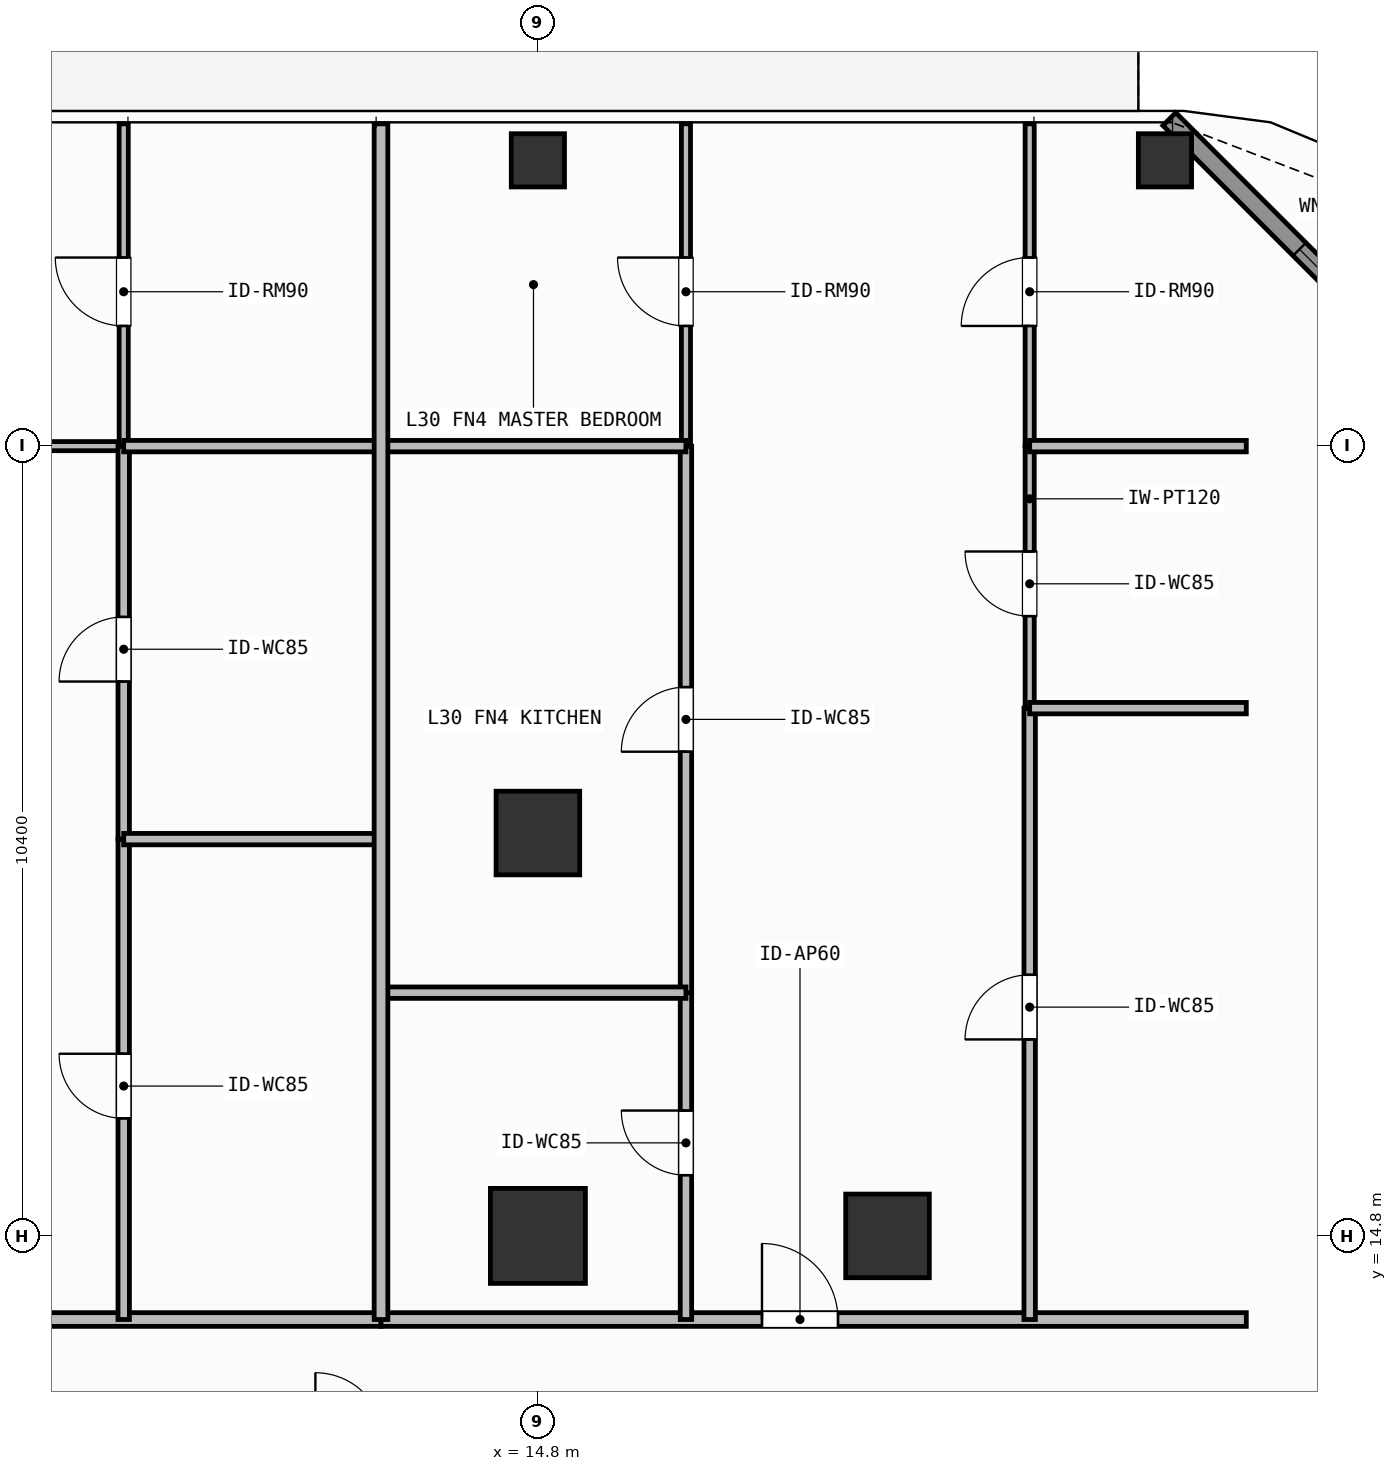
"""IFC4 building model, lengths in metres.
Left out: names, types, materials, properties, quantities, classifications, styles, units other than length and angle.
Written with IfcOpenShell. Run it as: python <this file> out.ifc"""

import sys

from ifc_helpers import new_model, si_unit, direction, frame, frame_2d, origin, origin_2d, place, context, subcontext, project, spatial, rectangle, hollow_rectangle, extrude, element, fill, save


model = new_model("IFC4")
c1 = context("Model", 3, precision=1e-05, world=origin(), true_north=direction((0.0, 1.0)))
c2 = subcontext(c1, "Body", "Model", "MODEL_VIEW")
j1 = project(units=[si_unit("LENGTHUNIT", "METRE"), si_unit("PLANEANGLEUNIT", "RADIAN")], contexts=[c1])
p1 = place(None, origin())
s1 = spatial("IfcSite", under=j1, at=p1, CompositionType="ELEMENT")
p2 = place(p1, origin())
s2 = spatial("IfcBuilding", under=s1, at=p2, CompositionType="ELEMENT")
p3 = place(p2, frame((0.0, 0.0, 121.2)))
s3 = spatial("IfcBuildingStorey", under=s2, at=p3, CompositionType="ELEMENT", Elevation=121.2)
p4 = place(p3, frame((14.8, 14.8, 0.0), z_axis=(0.0, 0.0, 1.0), x_axis=(1.0, 0.0, 0.0)))
e1 = element("IfcColumn", 1, at=p4, inside=s3, PredefinedType="COLUMN", context=c2, shape_type="SweptSolid", body=[
    extrude(rectangle(XDim=1.25, YDim=1.25, at=origin_2d()), origin(), (0.0, 0.0, 1.0), 3.9),
])
for number, where, z_axis, x_axis in (
    (2, (19.4, 14.8, 0.0), (0.0, 0.0, 1.0), (1.0, 0.0, 0.0)),
    (3, (14.8, 20.1, 0.0), (0.0, 0.0, 1.0), (1.0, 0.0, 0.0)),
):
    element("IfcColumn", number, at=place(p3, frame(where, z_axis=z_axis, x_axis=x_axis)), inside=s3, PredefinedType="COLUMN", context=c2, shape_type="SweptSolid", body=[
        extrude(rectangle(XDim=1.1, YDim=1.1, at=origin_2d()), origin(), (0.0, 0.0, 1.0), 3.9),
    ])
for number, where, z_axis, x_axis in (
    (4, (23.05, 28.95, 0.0), (0.0, 0.0, 1.0), (1.0, 0.0, 0.0)),
    (5, (14.8, 28.95, 0.0), (0.0, 0.0, 1.0), (1.0, 0.0, 0.0)),
):
    element("IfcColumn", number, at=place(p3, frame(where, z_axis=z_axis, x_axis=x_axis)), inside=s3, PredefinedType="COLUMN", context=c2, shape_type="SweptSolid", body=[
        extrude(hollow_rectangle(XDim=0.7, YDim=0.7, WallThickness=0.032, at=origin_2d()), origin(), (0.0, 0.0, 1.0), 3.9),
    ])
p5 = place(p3, frame((23.108, 29.492, 0.0), z_axis=(0.0, 0.0, 1.0), x_axis=(0.707087534163, -0.707126027686, 0.0)))
e6 = element("IfcWall", 6, at=p5, inside=s3, PredefinedType="SOLIDWALL", context=c2, shape_type="SweptSolid", body=[
    extrude(rectangle(XDim=6.342, YDim=0.24, at=frame_2d((3.171, 0.0))), origin(), (0.0, 0.0, 1.0), 3.68),
])
p6 = place(p5, frame((2.421, 0.0, 0.8)))
e7 = element("IfcOpeningElement", 7, at=p6, cuts=e6, PredefinedType="OPENING", context=c2, shape_type="SweptSolid", body=[
    extrude(rectangle(XDim=1.5, YDim=1.85, at=frame_2d((0.75, 0.925))), frame((0.0, 0.13, 0.0), z_axis=(0.0, -1.0, 0.0), x_axis=(1.0, 0.0, 0.0)), (0.0, 0.0, 1.0), 0.26),
])
p7 = place(p3, frame((3.9, 13.7, 0.0), z_axis=(0.0, 0.0, 1.0), x_axis=(1.0, 0.0, 0.0)))
e8 = element("IfcWall", 8, at=p7, inside=s3, PredefinedType="PARTITIONING", context=c2, shape_type="SweptSolid", body=[
    extrude(rectangle(XDim=8.836, YDim=0.18, at=frame_2d((4.418, 0.0))), origin(), (0.0, 0.0, 1.0), 3.68),
])
p8 = place(p7, frame((1.771, 0.0, 0.0)))
e9 = element("IfcOpeningElement", 9, at=p8, cuts=e8, PredefinedType="OPENING", context=c2, shape_type="SweptSolid", body=[
    extrude(rectangle(XDim=1.0, YDim=2.2, at=frame_2d((0.5, 1.1))), frame((0.0, 0.1, 0.0), z_axis=(0.0, -1.0, 0.0), x_axis=(1.0, 0.0, 0.0)), (0.0, 0.0, 1.0), 0.2),
])
p9 = place(p3, frame((3.9, 25.19, 0.0), z_axis=(0.0, 0.0, 1.0), x_axis=(1.0, 0.0, 0.0)))
e10 = element("IfcWall", 10, at=p9, inside=s3, PredefinedType="PARTITIONING", context=c2, shape_type="SweptSolid", body=[
    extrude(rectangle(XDim=5.451, YDim=0.12, at=frame_2d((2.726, 0.0))), origin(), (0.0, 0.0, 1.0), 3.68),
])
p10 = place(p9, frame((2.275, 0.0, 0.0)))
e11 = element("IfcOpeningElement", 11, at=p10, cuts=e10, PredefinedType="OPENING", context=c2, shape_type="SweptSolid", body=[
    extrude(rectangle(XDim=0.9, YDim=2.1, at=frame_2d((0.45, 1.05))), frame((0.0, 0.07, 0.0), z_axis=(0.0, -1.0, 0.0), x_axis=(1.0, 0.0, 0.0)), (0.0, 0.0, 1.0), 0.14),
])
p11 = place(p3, frame((9.351, 13.7, 0.0), z_axis=(0.0, 0.0, 1.0), x_axis=(0.0, 1.0, 0.0)))
e12 = element("IfcWall", 12, at=p11, inside=s3, PredefinedType="PARTITIONING", context=c2, shape_type="SweptSolid", body=[
    extrude(rectangle(XDim=6.32, YDim=0.15, at=frame_2d((3.16, 0.0))), origin(), (0.0, 0.0, 1.0), 3.68),
])
p12 = place(p11, frame((2.646, 0.0, 0.0)))
e13 = element("IfcOpeningElement", 13, at=p12, cuts=e12, PredefinedType="OPENING", context=c2, shape_type="SweptSolid", body=[
    extrude(rectangle(XDim=0.85, YDim=2.1, at=frame_2d((0.425, 1.05))), frame((0.0, 0.085, 0.0), z_axis=(0.0, -1.0, 0.0), x_axis=(1.0, 0.0, 0.0)), (0.0, 0.0, 1.0), 0.17),
])
p13 = place(p3, frame((9.351, 20.02, 0.0), z_axis=(0.0, 0.0, 1.0), x_axis=(0.0, 1.0, 0.0)))
e14 = element("IfcWall", 14, at=p13, inside=s3, PredefinedType="PARTITIONING", context=c2, shape_type="SweptSolid", body=[
    extrude(rectangle(XDim=5.17, YDim=0.15, at=frame_2d((2.585, 0.0))), origin(), (0.0, 0.0, 1.0), 3.68),
])
p14 = place(p13, frame((2.073, 0.0, 0.0)))
e15 = element("IfcOpeningElement", 15, at=p14, cuts=e14, PredefinedType="OPENING", context=c2, shape_type="SweptSolid", body=[
    extrude(rectangle(XDim=0.85, YDim=2.1, at=frame_2d((0.425, 1.05))), frame((0.0, 0.085, 0.0), z_axis=(0.0, -1.0, 0.0), x_axis=(1.0, 0.0, 0.0)), (0.0, 0.0, 1.0), 0.17),
])
p15 = place(p3, frame((9.351, 25.19, 0.0), z_axis=(0.0, 0.0, 1.0), x_axis=(0.0, 1.0, 0.0)))
e16 = element("IfcWall", 16, at=p15, inside=s3, PredefinedType="PARTITIONING", context=c2, shape_type="SweptSolid", body=[
    extrude(rectangle(XDim=4.24, YDim=0.12, at=frame_2d((2.12, 0.0))), origin(), (0.0, 0.0, 1.0), 3.68),
])
p16 = place(p15, frame((1.581, 0.0, 0.0)))
e17 = element("IfcOpeningElement", 17, at=p16, cuts=e16, PredefinedType="OPENING", context=c2, shape_type="SweptSolid", body=[
    extrude(rectangle(XDim=0.9, YDim=2.1, at=frame_2d((0.45, 1.05))), frame((0.0, 0.07, 0.0), z_axis=(0.0, -1.0, 0.0), x_axis=(1.0, 0.0, 0.0)), (0.0, 0.0, 1.0), 0.14),
])
p17 = place(p3, frame((12.736, 13.7, 0.0), z_axis=(0.0, 0.0, 1.0), x_axis=(1.0, 0.0, 0.0)))
e18 = element("IfcWall", 18, at=p17, inside=s3, PredefinedType="PARTITIONING", context=c2, shape_type="SweptSolid", body=[
    extrude(rectangle(XDim=11.384, YDim=0.18, at=frame_2d((5.692, 0.0))), origin(), (0.0, 0.0, 1.0), 3.68),
])
p18 = place(p17, frame((5.012, 0.0, 0.0)))
e19 = element("IfcOpeningElement", 19, at=p18, cuts=e18, PredefinedType="OPENING", context=c2, shape_type="SweptSolid", body=[
    extrude(rectangle(XDim=1.0, YDim=2.2, at=frame_2d((0.5, 1.1))), frame((0.0, 0.1, 0.0), z_axis=(0.0, -1.0, 0.0), x_axis=(1.0, 0.0, 0.0)), (0.0, 0.0, 1.0), 0.2),
])
p19 = place(p3, frame((16.748, 13.7, 0.0), z_axis=(0.0, 0.0, 1.0), x_axis=(0.0, 1.0, 0.0)))
e20 = element("IfcWall", 20, at=p19, inside=s3, PredefinedType="PARTITIONING", context=c2, shape_type="SweptSolid", body=[
    extrude(rectangle(XDim=4.3, YDim=0.15, at=frame_2d((2.15, 0.0))), origin(), (0.0, 0.0, 1.0), 3.68),
])
p20 = place(p19, frame((1.899, 0.0, 0.0)))
e21 = element("IfcOpeningElement", 21, at=p20, cuts=e20, PredefinedType="OPENING", context=c2, shape_type="SweptSolid", body=[
    extrude(rectangle(XDim=0.85, YDim=2.1, at=frame_2d((0.425, 1.05))), frame((0.0, 0.085, 0.0), z_axis=(0.0, -1.0, 0.0), x_axis=(1.0, 0.0, 0.0)), (0.0, 0.0, 1.0), 0.17),
])
p21 = place(p3, frame((16.748, 18.0, 0.0), z_axis=(0.0, 0.0, 1.0), x_axis=(0.0, 1.0, 0.0)))
e22 = element("IfcWall", 22, at=p21, inside=s3, PredefinedType="PARTITIONING", context=c2, shape_type="SweptSolid", body=[
    extrude(rectangle(XDim=7.19, YDim=0.15, at=frame_2d((3.595, 0.0))), origin(), (0.0, 0.0, 1.0), 3.68),
])
p22 = place(p21, frame((3.17, 0.0, 0.0)))
e23 = element("IfcOpeningElement", 23, at=p22, cuts=e22, PredefinedType="OPENING", context=c2, shape_type="SweptSolid", body=[
    extrude(rectangle(XDim=0.85, YDim=2.1, at=frame_2d((0.425, 1.05))), frame((0.0, 0.085, 0.0), z_axis=(0.0, -1.0, 0.0), x_axis=(1.0, 0.0, 0.0)), (0.0, 0.0, 1.0), 0.17),
])
p23 = place(p3, frame((16.748, 25.19, 0.0), z_axis=(0.0, 0.0, 1.0), x_axis=(0.0, 1.0, 0.0)))
e24 = element("IfcWall", 24, at=p23, inside=s3, PredefinedType="PARTITIONING", context=c2, shape_type="SweptSolid", body=[
    extrude(rectangle(XDim=4.24, YDim=0.12, at=frame_2d((2.12, 0.0))), origin(), (0.0, 0.0, 1.0), 3.68),
])
p24 = place(p23, frame((1.581, 0.0, 0.0)))
e25 = element("IfcOpeningElement", 25, at=p24, cuts=e24, PredefinedType="OPENING", context=c2, shape_type="SweptSolid", body=[
    extrude(rectangle(XDim=0.9, YDim=2.1, at=frame_2d((0.45, 1.05))), frame((0.0, 0.07, 0.0), z_axis=(0.0, -1.0, 0.0), x_axis=(1.0, 0.0, 0.0)), (0.0, 0.0, 1.0), 0.14),
])
p25 = place(p3, frame((21.27, 13.7, 0.0), z_axis=(0.0, 0.0, 1.0), x_axis=(0.0, 1.0, 0.0)))
e26 = element("IfcWall", 26, at=p25, inside=s3, PredefinedType="PARTITIONING", context=c2, shape_type="SweptSolid", body=[
    extrude(rectangle(XDim=8.043, YDim=0.15, at=frame_2d((4.021, 0.0))), origin(), (0.0, 0.0, 1.0), 3.68),
])
p26 = place(p25, frame((3.685, 0.0, 0.0)))
e27 = element("IfcOpeningElement", 27, at=p26, cuts=e26, PredefinedType="OPENING", context=c2, shape_type="SweptSolid", body=[
    extrude(rectangle(XDim=0.85, YDim=2.1, at=frame_2d((0.425, 1.05))), frame((0.0, 0.085, 0.0), z_axis=(0.0, -1.0, 0.0), x_axis=(1.0, 0.0, 0.0)), (0.0, 0.0, 1.0), 0.17),
])
p27 = place(p3, frame((21.27, 21.743, 0.0), z_axis=(0.0, 0.0, 1.0), x_axis=(0.0, 1.0, 0.0)))
e28 = element("IfcWall", 28, at=p27, inside=s3, PredefinedType="PARTITIONING", context=c2, shape_type="SweptSolid", body=[
    extrude(rectangle(XDim=3.447, YDim=0.12, at=frame_2d((1.724, 0.0))), origin(), (0.0, 0.0, 1.0), 3.68),
])
p28 = place(p27, frame((1.211, 0.0, 0.0)))
e29 = element("IfcOpeningElement", 29, at=p28, cuts=e28, PredefinedType="OPENING", context=c2, shape_type="SweptSolid", body=[
    extrude(rectangle(XDim=0.85, YDim=2.1, at=frame_2d((0.425, 1.05))), frame((0.0, 0.07, 0.0), z_axis=(0.0, -1.0, 0.0), x_axis=(1.0, 0.0, 0.0)), (0.0, 0.0, 1.0), 0.14),
])
p29 = place(p3, frame((21.27, 25.19, 0.0), z_axis=(0.0, 0.0, 1.0), x_axis=(0.0, 1.0, 0.0)))
e30 = element("IfcWall", 30, at=p29, inside=s3, PredefinedType="PARTITIONING", context=c2, shape_type="SweptSolid", body=[
    extrude(rectangle(XDim=4.24, YDim=0.12, at=frame_2d((2.12, 0.0))), origin(), (0.0, 0.0, 1.0), 3.68),
])
p30 = place(p29, frame((1.581, 0.0, 0.0)))
e31 = element("IfcOpeningElement", 31, at=p30, cuts=e30, PredefinedType="OPENING", context=c2, shape_type="SweptSolid", body=[
    extrude(rectangle(XDim=0.9, YDim=2.1, at=frame_2d((0.45, 1.05))), frame((0.0, 0.07, 0.0), z_axis=(0.0, -1.0, 0.0), x_axis=(1.0, 0.0, 0.0)), (0.0, 0.0, 1.0), 0.14),
])
p31 = place(p3, frame((9.351, 20.02, 0.0), z_axis=(0.0, 0.0, 1.0), x_axis=(1.0, 0.0, 0.0)))
e32 = element("IfcWall", 32, at=p31, inside=s3, PredefinedType="PARTITIONING", context=c2, shape_type="SweptSolid", body=[
    extrude(rectangle(XDim=3.385, YDim=0.15, at=frame_2d((1.692, 0.0))), origin(), (0.0, 0.0, 1.0), 3.082),
])
p32 = place(p3, frame((9.351, 25.19, 0.0), z_axis=(0.0, 0.0, 1.0), x_axis=(1.0, 0.0, 0.0)))
e33 = element("IfcWall", 33, at=p32, inside=s3, PredefinedType="PARTITIONING", context=c2, shape_type="SweptSolid", body=[
    extrude(rectangle(XDim=3.385, YDim=0.15, at=frame_2d((1.692, 0.0))), origin(), (0.0, 0.0, 1.0), 3.68),
])
for number, where, z_axis, x_axis in (
    (34, (12.736, 18.0, 0.0), (0.0, 0.0, 1.0), (1.0, 0.0, 0.0)),
    (35, (12.736, 25.19, 0.0), (0.0, 0.0, 1.0), (1.0, 0.0, 0.0)),
):
    element("IfcWall", number, at=place(p3, frame(where, z_axis=z_axis, x_axis=x_axis)), inside=s3, PredefinedType="PARTITIONING", context=c2, shape_type="SweptSolid", body=[
        extrude(rectangle(XDim=4.012, YDim=0.15, at=frame_2d((2.006, 0.0))), origin(), (0.0, 0.0, 1.0), 3.68),
    ])
p33 = place(p3, frame((21.27, 21.743, 0.0), z_axis=(0.0, 0.0, 1.0), x_axis=(1.0, 0.0, 0.0)))
e36 = element("IfcWall", 36, at=p33, inside=s3, PredefinedType="PARTITIONING", context=c2, shape_type="SweptSolid", body=[
    extrude(rectangle(XDim=2.85, YDim=0.15, at=frame_2d((1.425, 0.0))), origin(), (0.0, 0.0, 1.0), 3.37),
])
p34 = place(p3, frame((21.27, 25.19, 0.0), z_axis=(0.0, 0.0, 1.0), x_axis=(1.0, 0.0, 0.0)))
e37 = element("IfcWall", 37, at=p34, inside=s3, PredefinedType="PARTITIONING", context=c2, shape_type="SweptSolid", body=[
    extrude(rectangle(XDim=2.85, YDim=0.15, at=frame_2d((1.425, 0.0))), origin(), (0.0, 0.0, 1.0), 3.68),
])
p35 = place(p3, frame((12.736, 13.7, 0.0), z_axis=(0.0, 0.0, 1.0), x_axis=(0.0, 1.0, 0.0)))
e38 = element("IfcWall", 38, at=p35, inside=s3, PredefinedType="PARTITIONING", context=c2, shape_type="SweptSolid", body=[
    extrude(rectangle(XDim=15.73, YDim=0.18, at=frame_2d((7.865, 0.0))), origin(), (0.0, 0.0, 1.0), 3.68),
])
p36 = place(p6, origin())
e39 = element("IfcWindow", 39, at=p36, inside=s3, PartitioningType="SINGLE_PANEL", PredefinedType="WINDOW", context=c2, shape_type="SweptSolid", body=[
    extrude(rectangle(XDim=1.5, YDim=1.85, at=frame_2d((0.75, 0.925))), frame((0.0, 0.03, 0.0), z_axis=(0.0, -1.0, 0.0), x_axis=(1.0, 0.0, 0.0)), (0.0, 0.0, 1.0), 0.06),
])
fill(e7, e39)
p37 = place(p12, origin())
e40 = element("IfcDoor", 40, at=p37, inside=s3, OperationType="SINGLE_SWING_RIGHT", PredefinedType="DOOR", context=c2, shape_type="SweptSolid", body=[
    extrude(rectangle(XDim=0.85, YDim=2.1, at=frame_2d((0.425, 1.05))), frame((0.0, 0.025, 0.0), z_axis=(0.0, -1.0, 0.0), x_axis=(1.0, 0.0, 0.0)), (0.0, 0.0, 1.0), 0.05),
])
fill(e13, e40)
p38 = place(p14, origin())
e41 = element("IfcDoor", 41, at=p38, inside=s3, OperationType="SINGLE_SWING_LEFT", PredefinedType="DOOR", context=c2, shape_type="SweptSolid", body=[
    extrude(rectangle(XDim=0.85, YDim=2.1, at=frame_2d((0.425, 1.05))), frame((0.0, 0.025, 0.0), z_axis=(0.0, -1.0, 0.0), x_axis=(1.0, 0.0, 0.0)), (0.0, 0.0, 1.0), 0.05),
])
fill(e15, e41)
p39 = place(p16, origin())
e42 = element("IfcDoor", 42, at=p39, inside=s3, OperationType="SINGLE_SWING_RIGHT", PredefinedType="DOOR", context=c2, shape_type="SweptSolid", body=[
    extrude(rectangle(XDim=0.9, YDim=2.1, at=frame_2d((0.45, 1.05))), frame((0.0, 0.025, 0.0), z_axis=(0.0, -1.0, 0.0), x_axis=(1.0, 0.0, 0.0)), (0.0, 0.0, 1.0), 0.05),
])
fill(e17, e42)
p40 = place(p18, origin())
e43 = element("IfcDoor", 43, at=p40, inside=s3, OperationType="SINGLE_SWING_LEFT", PredefinedType="DOOR", context=c2, shape_type="SweptSolid", body=[
    extrude(rectangle(XDim=1.0, YDim=2.2, at=frame_2d((0.5, 1.1))), frame((0.0, 0.025, 0.0), z_axis=(0.0, -1.0, 0.0), x_axis=(1.0, 0.0, 0.0)), (0.0, 0.0, 1.0), 0.05),
])
fill(e19, e43)
p41 = place(p20, origin())
e44 = element("IfcDoor", 44, at=p41, inside=s3, OperationType="SINGLE_SWING_RIGHT", PredefinedType="DOOR", context=c2, shape_type="SweptSolid", body=[
    extrude(rectangle(XDim=0.85, YDim=2.1, at=frame_2d((0.425, 1.05))), frame((0.0, 0.025, 0.0), z_axis=(0.0, -1.0, 0.0), x_axis=(1.0, 0.0, 0.0)), (0.0, 0.0, 1.0), 0.05),
])
fill(e21, e44)
p42 = place(p22, origin())
e45 = element("IfcDoor", 45, at=p42, inside=s3, OperationType="SINGLE_SWING_LEFT", PredefinedType="DOOR", context=c2, shape_type="SweptSolid", body=[
    extrude(rectangle(XDim=0.85, YDim=2.1, at=frame_2d((0.425, 1.05))), frame((0.0, 0.025, 0.0), z_axis=(0.0, -1.0, 0.0), x_axis=(1.0, 0.0, 0.0)), (0.0, 0.0, 1.0), 0.05),
])
fill(e23, e45)
p43 = place(p24, origin())
e46 = element("IfcDoor", 46, at=p43, inside=s3, OperationType="SINGLE_SWING_RIGHT", PredefinedType="DOOR", context=c2, shape_type="SweptSolid", body=[
    extrude(rectangle(XDim=0.9, YDim=2.1, at=frame_2d((0.45, 1.05))), frame((0.0, 0.025, 0.0), z_axis=(0.0, -1.0, 0.0), x_axis=(1.0, 0.0, 0.0)), (0.0, 0.0, 1.0), 0.05),
])
fill(e25, e46)
p44 = place(p26, origin())
e47 = element("IfcDoor", 47, at=p44, inside=s3, OperationType="SINGLE_SWING_LEFT", PredefinedType="DOOR", context=c2, shape_type="SweptSolid", body=[
    extrude(rectangle(XDim=0.85, YDim=2.1, at=frame_2d((0.425, 1.05))), frame((0.0, 0.025, 0.0), z_axis=(0.0, -1.0, 0.0), x_axis=(1.0, 0.0, 0.0)), (0.0, 0.0, 1.0), 0.05),
])
fill(e27, e47)
p45 = place(p28, origin())
e48 = element("IfcDoor", 48, at=p45, inside=s3, OperationType="SINGLE_SWING_RIGHT", PredefinedType="DOOR", context=c2, shape_type="SweptSolid", body=[
    extrude(rectangle(XDim=0.85, YDim=2.1, at=frame_2d((0.425, 1.05))), frame((0.0, 0.025, 0.0), z_axis=(0.0, -1.0, 0.0), x_axis=(1.0, 0.0, 0.0)), (0.0, 0.0, 1.0), 0.05),
])
fill(e29, e48)
p46 = place(p30, origin())
e49 = element("IfcDoor", 49, at=p46, inside=s3, OperationType="SINGLE_SWING_LEFT", PredefinedType="DOOR", context=c2, shape_type="SweptSolid", body=[
    extrude(rectangle(XDim=0.9, YDim=2.1, at=frame_2d((0.45, 1.05))), frame((0.0, 0.025, 0.0), z_axis=(0.0, -1.0, 0.0), x_axis=(1.0, 0.0, 0.0)), (0.0, 0.0, 1.0), 0.05),
])
fill(e31, e49)
save(model, sys.argv[1])
